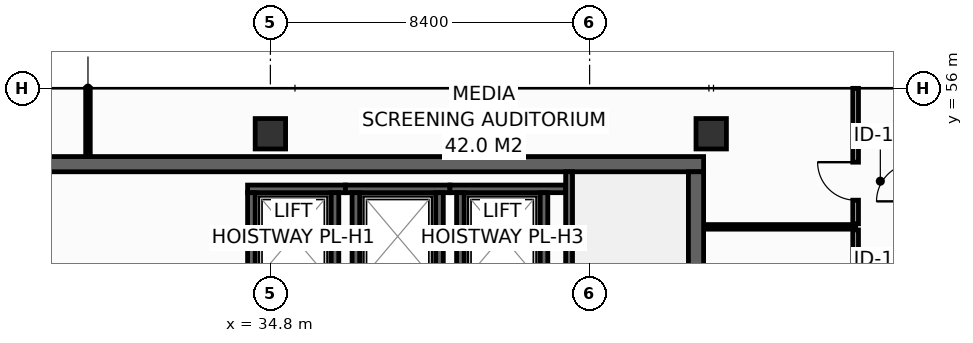
"""IFC4 building model, lengths in metres.
Left out: names, types, materials, properties, quantities, classifications, styles, units other than length and angle.
Written with IfcOpenShell. Run it as: python <this file> out.ifc"""

import sys

from ifc_helpers import new_model, si_unit, direction, frame, frame_2d, origin, origin_2d, place, context, subcontext, project, spatial, rectangle, hollow_rectangle, extrude, element, fill, save


model = new_model("IFC4")
c1 = context("Model", 3, precision=1e-05, world=origin(), true_north=direction((0.0, 1.0)))
c2 = subcontext(c1, "Body", "Model", "MODEL_VIEW")
j1 = project(units=[si_unit("LENGTHUNIT", "METRE"), si_unit("PLANEANGLEUNIT", "RADIAN")], contexts=[c1])
p1 = place(None, origin())
s1 = spatial("IfcSite", under=j1, at=p1, CompositionType="ELEMENT")
p2 = place(p1, origin())
s2 = spatial("IfcBuilding", under=s1, at=p2, CompositionType="ELEMENT")
p3 = place(p2, frame((0.0, 0.0, 238.2)))
s3 = spatial("IfcBuildingStorey", under=s2, at=p3, CompositionType="ELEMENT", Elevation=238.2)
p4 = place(p3, frame((13.7, 54.0, 0.0), z_axis=(0.0, 0.0, 1.0), x_axis=(1.0, 0.0, 0.0)))
e1 = element("IfcWall", 1, at=p4, inside=s3, PredefinedType="SHEAR", context=c2, shape_type="SweptSolid", body=[
    extrude(rectangle(XDim=32.5, YDim=0.4, at=frame_2d((16.25, 0.0))), origin(), (0.0, 0.0, 1.0), 3.55),
])
p5 = place(p3, frame((46.0, 43.4, 0.0), z_axis=(0.0, 0.0, 1.0), x_axis=(0.0, 1.0, 0.0)))
e2 = element("IfcWall", 2, at=p5, inside=s3, PredefinedType="SHEAR", context=c2, shape_type="SweptSolid", body=[
    extrude(rectangle(XDim=10.4, YDim=0.4, at=frame_2d((5.2, 0.0))), origin(), (0.0, 0.0, 1.0), 3.55),
])
for number, where, z_axis, x_axis in (
    (3, (34.8, 54.8, 0.0), (0.0, 0.0, 1.0), (1.0, 0.0, 0.0)),
    (4, (46.4, 54.8, 0.0), (0.0, 0.0, 1.0), (1.0, 0.0, 0.0)),
):
    element("IfcColumn", number, at=place(p3, frame(where, z_axis=z_axis, x_axis=x_axis)), inside=s3, PredefinedType="COLUMN", context=c2, shape_type="SweptSolid", body=[
        extrude(hollow_rectangle(XDim=0.8, YDim=0.8, WallThickness=0.036, at=origin_2d()), origin(), (0.0, 0.0, 1.0), 3.8),
    ])
p6 = place(p3, frame((34.2, 53.35, 0.0), z_axis=(0.0, 0.0, 1.0), x_axis=(1.0, 0.0, 0.0)))
e5 = element("IfcWall", 5, at=p6, inside=s3, PredefinedType="SHEAR", context=c2, shape_type="SweptSolid", body=[
    extrude(rectangle(XDim=2.575, YDim=0.2, at=frame_2d((1.288, 0.0))), origin(), (0.0, 0.0, 1.0), 3.55),
])
for number, where, z_axis, x_axis in (
    (6, (34.3, 50.95, 0.0), (0.0, 0.0, 1.0), (0.0, 1.0, 0.0)),
    (7, (36.5, 50.95, 0.0), (0.0, 0.0, 1.0), (0.0, 1.0, 0.0)),
):
    element("IfcWall", number, at=place(p3, frame(where, z_axis=z_axis, x_axis=x_axis)), inside=s3, PredefinedType="SHEAR", context=c2, shape_type="SweptSolid", body=[
        extrude(rectangle(XDim=2.3, YDim=0.2, at=frame_2d((1.15, 0.0))), origin(), (0.0, 0.0, 1.0), 3.55),
    ])
p7 = place(p3, frame((36.775, 53.35, 0.0), z_axis=(0.0, 0.0, 1.0), x_axis=(1.0, 0.0, 0.0)))
e8 = element("IfcWall", 8, at=p7, inside=s3, PredefinedType="SHEAR", context=c2, shape_type="SweptSolid", body=[
    extrude(rectangle(XDim=2.75, YDim=0.2, at=frame_2d((1.375, 0.0))), origin(), (0.0, 0.0, 1.0), 3.55),
])
for number, where, z_axis, x_axis in (
    (9, (37.05, 50.95, 0.0), (0.0, 0.0, 1.0), (0.0, 1.0, 0.0)),
    (10, (39.25, 50.95, 0.0), (0.0, 0.0, 1.0), (0.0, 1.0, 0.0)),
):
    element("IfcWall", number, at=place(p3, frame(where, z_axis=z_axis, x_axis=x_axis)), inside=s3, PredefinedType="SHEAR", context=c2, shape_type="SweptSolid", body=[
        extrude(rectangle(XDim=2.3, YDim=0.2, at=frame_2d((1.15, 0.0))), origin(), (0.0, 0.0, 1.0), 3.55),
    ])
p8 = place(p3, frame((39.525, 53.35, 0.0), z_axis=(0.0, 0.0, 1.0), x_axis=(1.0, 0.0, 0.0)))
e11 = element("IfcWall", 11, at=p8, inside=s3, PredefinedType="SHEAR", context=c2, shape_type="SweptSolid", body=[
    extrude(rectangle(XDim=3.045, YDim=0.2, at=frame_2d((1.522, 0.0))), origin(), (0.0, 0.0, 1.0), 3.55),
])
for number, where, z_axis, x_axis in (
    (12, (39.8, 50.95, 0.0), (0.0, 0.0, 1.0), (0.0, 1.0, 0.0)),
    (13, (42.0, 50.95, 0.0), (0.0, 0.0, 1.0), (0.0, 1.0, 0.0)),
):
    element("IfcWall", number, at=place(p3, frame(where, z_axis=z_axis, x_axis=x_axis)), inside=s3, PredefinedType="SHEAR", context=c2, shape_type="SweptSolid", body=[
        extrude(rectangle(XDim=2.3, YDim=0.2, at=frame_2d((1.15, 0.0))), origin(), (0.0, 0.0, 1.0), 3.55),
    ])
p9 = place(p3, frame((42.66, 53.8, 0.0), z_axis=(0.0, 0.0, 1.0), x_axis=(0.0, -1.0, 0.0)))
e14 = element("IfcWall", 14, at=p9, inside=s3, PredefinedType="SHEAR", context=c2, shape_type="SweptSolid", body=[
    extrude(rectangle(XDim=10.4, YDim=0.18, at=frame_2d((5.2, 0.0))), origin(), (0.0, 0.0, 1.0), 3.55),
])
p10 = place(p9, frame((8.99, 0.0, 0.0)))
e15 = element("IfcOpeningElement", 15, at=p10, cuts=e14, PredefinedType="OPENING", context=c2, shape_type="SweptSolid", body=[
    extrude(rectangle(XDim=1.1, YDim=2.15, at=frame_2d((0.55, 1.075))), frame((0.0, 0.1, 0.0), z_axis=(0.0, -1.0, 0.0), x_axis=(1.0, 0.0, 0.0)), (0.0, 0.0, 1.0), 0.2),
])
p11 = place(p3, frame((46.22, 52.35, 0.0), z_axis=(0.0, 0.0, 1.0), x_axis=(1.0, 0.0, 0.0)))
e16 = element("IfcWall", 16, at=p11, inside=s3, PredefinedType="PARTITIONING", context=c2, shape_type="SweptSolid", body=[
    extrude(rectangle(XDim=3.98, YDim=0.12, at=frame_2d((1.99, 0.0))), origin(), (0.0, 0.0, 1.0), 3.55),
])
p12 = place(p3, frame((30.0, 54.22, 0.0), z_axis=(0.0, 0.0, 1.0), x_axis=(0.0, 1.0, 0.0)))
e17 = element("IfcWall", 17, at=p12, inside=s3, PredefinedType="PARTITIONING", context=c2, shape_type="SweptSolid", body=[
    extrude(rectangle(XDim=1.775, YDim=0.12, at=frame_2d((0.888, 0.0))), origin(), (0.0, 0.0, 1.0), 2.935),
])
p13 = place(p3, frame((50.2, 48.29, 0.0), z_axis=(0.0, 0.0, 1.0), x_axis=(0.0, 1.0, 0.0)))
e18 = element("IfcWall", 18, at=p13, inside=s3, PredefinedType="PARTITIONING", context=c2, shape_type="SweptSolid", body=[
    extrude(rectangle(XDim=3.98, YDim=0.15, at=frame_2d((1.99, 0.0))), origin(), (0.0, 0.0, 1.0), 3.55),
])
p14 = place(p13, frame((1.49, 0.0, 0.0)))
e19 = element("IfcOpeningElement", 19, at=p14, cuts=e18, PredefinedType="OPENING", context=c2, shape_type="SweptSolid", body=[
    extrude(rectangle(XDim=1.0, YDim=2.15, at=frame_2d((0.5, 1.075))), frame((0.0, 0.085, 0.0), z_axis=(0.0, -1.0, 0.0), x_axis=(1.0, 0.0, 0.0)), (0.0, 0.0, 1.0), 0.17),
])
p15 = place(p3, frame((50.2, 52.43, 0.0), z_axis=(0.0, 0.0, 1.0), x_axis=(0.0, 1.0, 0.0)))
e20 = element("IfcWall", 20, at=p15, inside=s3, PredefinedType="PARTITIONING", context=c2, shape_type="SweptSolid", body=[
    extrude(rectangle(XDim=3.565, YDim=0.15, at=frame_2d((1.783, 0.0))), origin(), (0.0, 0.0, 1.0), 2.935),
])
p16 = place(p15, frame((0.622, 0.0, 0.0)))
e21 = element("IfcOpeningElement", 21, at=p16, cuts=e20, PredefinedType="OPENING", context=c2, shape_type="SweptSolid", body=[
    extrude(rectangle(XDim=1.0, YDim=2.15, at=frame_2d((0.5, 1.075))), frame((0.0, 0.085, 0.0), z_axis=(0.0, -1.0, 0.0), x_axis=(1.0, 0.0, 0.0)), (0.0, 0.0, 1.0), 0.17),
])
p17 = place(p16, origin())
e22 = element("IfcDoor", 22, at=p17, inside=s3, OperationType="SINGLE_SWING_RIGHT", PredefinedType="DOOR", context=c2, shape_type="SweptSolid", body=[
    extrude(rectangle(XDim=1.0, YDim=2.15, at=frame_2d((0.5, 1.075))), frame((0.0, 0.025, 0.0), z_axis=(0.0, -1.0, 0.0), x_axis=(1.0, 0.0, 0.0)), (0.0, 0.0, 1.0), 0.05),
])
fill(e21, e22)
save(model, sys.argv[1])
